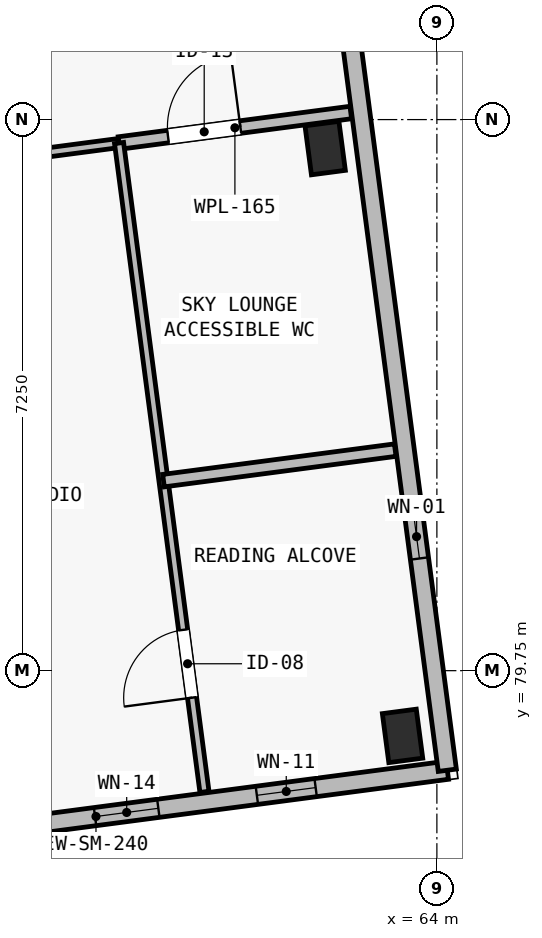
"""IFC4 building model, lengths in metres.
Left out: names, types, materials, properties, quantities, classifications, styles, units other than length and angle.
Written with IfcOpenShell. Run it as: python <this file> out.ifc"""

import sys

from ifc_helpers import new_model, si_unit, direction, frame, frame_2d, origin, origin_2d, place, context, subcontext, project, spatial, rectangle, extrude, element, fill, save


model = new_model("IFC4")
c1 = context("Model", 3, precision=1e-05, world=origin(), true_north=direction((0.0, 1.0)))
c2 = subcontext(c1, "Body", "Model", "MODEL_VIEW")
j1 = project(units=[si_unit("LENGTHUNIT", "METRE"), si_unit("PLANEANGLEUNIT", "RADIAN")], contexts=[c1])
p1 = place(None, origin())
s1 = spatial("IfcSite", under=j1, at=p1, CompositionType="ELEMENT")
p2 = place(p1, origin())
s2 = spatial("IfcBuilding", under=s1, at=p2, CompositionType="ELEMENT")
p3 = place(p2, frame((0.0, 0.0, 34.4)))
s3 = spatial("IfcBuildingStorey", under=s2, at=p3, CompositionType="ELEMENT", Elevation=34.4)
for number, where, z_axis, x_axis in (
    (1, (63.548, 78.892, 0.0), (0.0, 0.0, 1.0), (0.991, 0.131, 0.0)),
    (2, (62.53, 86.625, 0.0), (0.0, 0.0, 1.0), (0.991, 0.131, 0.0)),
):
    element("IfcColumn", number, at=place(p3, frame(where, z_axis=z_axis, x_axis=x_axis)), inside=s3, PredefinedType="COLUMN", context=c2, shape_type="SweptSolid", body=[
        extrude(rectangle(XDim=0.45, YDim=0.65, at=origin_2d()), origin(), (0.0, 0.0, 1.0), 3.25),
    ])
p4 = place(p3, frame((64.137, 78.44, 0.0), z_axis=(0.0, 0.0, 1.0), x_axis=(-0.991446273426, -0.130515466173, 0.0)))
e3 = element("IfcWall", 3, at=p4, inside=s3, PredefinedType="SOLIDWALL", context=c2, shape_type="SweptSolid", body=[
    extrude(rectangle(XDim=9.325, YDim=0.24, at=frame_2d((4.663, 0.0))), origin(), (0.0, 0.0, 1.0), 3.0),
])
p5 = place(p4, frame((1.747, 0.0, 0.42)))
e4 = element("IfcOpeningElement", 4, at=p5, cuts=e3, PredefinedType="OPENING", context=c2, shape_type="SweptSolid", body=[
    extrude(rectangle(XDim=0.78, YDim=2.2, at=frame_2d((0.39, 1.1))), frame((0.0, 0.135, 0.0), z_axis=(0.0, -1.0, 0.0), x_axis=(1.0, 0.0, 0.0)), (0.0, 0.0, 1.0), 0.27),
])
p6 = place(p4, frame((3.835, 0.0, 0.42)))
e5 = element("IfcOpeningElement", 5, at=p6, cuts=e3, PredefinedType="OPENING", context=c2, shape_type="SweptSolid", body=[
    extrude(rectangle(XDim=0.84, YDim=2.28, at=frame_2d((0.42, 1.14))), frame((0.0, 0.135, 0.0), z_axis=(0.0, -1.0, 0.0), x_axis=(1.0, 0.0, 0.0)), (0.0, 0.0, 1.0), 0.27),
])
p7 = place(p4, frame((7.855, 0.0, 0.48)))
e6 = element("IfcOpeningElement", 6, at=p7, cuts=e3, PredefinedType="OPENING", context=c2, shape_type="SweptSolid", body=[
    extrude(rectangle(XDim=0.86, YDim=2.36, at=frame_2d((0.43, 1.18))), frame((0.0, 0.135, 0.0), z_axis=(0.0, -1.0, 0.0), x_axis=(1.0, 0.0, 0.0)), (0.0, 0.0, 1.0), 0.27),
])
p8 = place(p3, frame((61.39, 99.31, 0.0), z_axis=(0.0, 0.0, 1.0), x_axis=(0.13052411616, -0.99144513469, 0.0)))
e7 = element("IfcWall", 7, at=p8, inside=s3, PredefinedType="SOLIDWALL", context=c2, shape_type="SweptSolid", body=[
    extrude(rectangle(XDim=21.05, YDim=0.24, at=frame_2d((10.525, 0.0))), origin(), (0.0, 0.0, 1.0), 3.0),
])
p9 = place(p8, frame((2.81, 0.0, 0.45)))
e8 = element("IfcOpeningElement", 8, at=p9, cuts=e7, PredefinedType="OPENING", context=c2, shape_type="SweptSolid", body=[
    extrude(rectangle(XDim=0.74, YDim=2.26, at=frame_2d((0.37, 1.13))), frame((0.0, 0.135, 0.0), z_axis=(0.0, -1.0, 0.0), x_axis=(1.0, 0.0, 0.0)), (0.0, 0.0, 1.0), 0.27),
])
p10 = place(p8, frame((17.66, 0.0, 0.52)))
e9 = element("IfcOpeningElement", 9, at=p10, cuts=e7, PredefinedType="OPENING", context=c2, shape_type="SweptSolid", body=[
    extrude(rectangle(XDim=0.58, YDim=2.16, at=frame_2d((0.29, 1.08))), frame((0.0, 0.135, 0.0), z_axis=(0.0, -1.0, 0.0), x_axis=(1.0, 0.0, 0.0)), (0.0, 0.0, 1.0), 0.27),
])
p11 = place(p3, frame((53.984, 85.924, 0.0), z_axis=(0.0, 0.0, 1.0), x_axis=(0.991446810256, 0.130511388136, 0.0)))
e10 = element("IfcWall", 10, at=p11, inside=s3, PredefinedType="PARTITIONING", context=c2, shape_type="SweptSolid", body=[
    extrude(rectangle(XDim=5.885, YDim=0.12, at=frame_2d((2.942, 0.0))), origin(), (0.0, 0.0, 1.0), 2.97),
])
p12 = place(p11, frame((1.15, 0.0, 0.0)))
e11 = element("IfcOpeningElement", 11, at=p12, cuts=e10, PredefinedType="OPENING", context=c2, shape_type="SweptSolid", body=[
    extrude(rectangle(XDim=1.15, YDim=2.15, at=frame_2d((0.575, 1.075))), frame((0.0, 0.075, 0.0), z_axis=(0.0, -1.0, 0.0), x_axis=(1.0, 0.0, 0.0)), (0.0, 0.0, 1.0), 0.15),
])
p13 = place(p3, frame((59.818, 86.692, 0.0), z_axis=(0.0, 0.0, 1.0), x_axis=(0.991444293548, 0.130530505213, 0.0)))
e12 = element("IfcWall", 12, at=p13, inside=s3, PredefinedType="PLUMBINGWALL", context=c2, shape_type="SweptSolid", body=[
    extrude(rectangle(XDim=3.075, YDim=0.165, at=frame_2d((1.538, 0.0))), origin(), (0.0, 0.0, 1.0), 2.97),
])
p14 = place(p13, frame((0.65, 0.0, 0.0)))
e13 = element("IfcOpeningElement", 13, at=p14, cuts=e12, PredefinedType="OPENING", context=c2, shape_type="SweptSolid", body=[
    extrude(rectangle(XDim=0.96, YDim=2.12, at=frame_2d((0.48, 1.06))), frame((0.0, 0.097, 0.0), z_axis=(0.0, -1.0, 0.0), x_axis=(1.0, 0.0, 0.0)), (0.0, 0.0, 1.0), 0.195),
])
p15 = place(p3, frame((60.942, 78.155, 0.0), z_axis=(0.0, 0.0, 1.0), x_axis=(-0.13051979335, 0.99144570378, 0.0)))
e14 = element("IfcWall", 14, at=p15, inside=s3, PredefinedType="PARTITIONING", context=c2, shape_type="SweptSolid", body=[
    extrude(rectangle(XDim=8.61, YDim=0.12, at=frame_2d((4.305, 0.0))), origin(), (0.0, 0.0, 1.0), 2.97),
])
p16 = place(p15, frame((1.25, 0.0, 0.0)))
e15 = element("IfcOpeningElement", 15, at=p16, cuts=e14, PredefinedType="OPENING", context=c2, shape_type="SweptSolid", body=[
    extrude(rectangle(XDim=0.9, YDim=2.1, at=frame_2d((0.45, 1.05))), frame((0.0, 0.075, 0.0), z_axis=(0.0, -1.0, 0.0), x_axis=(1.0, 0.0, 0.0)), (0.0, 0.0, 1.0), 0.15),
])
p17 = place(p3, frame((60.403, 82.25, 0.0), z_axis=(0.0, 0.0, 1.0), x_axis=(0.991444293548, 0.130530505213, 0.0)))
e16 = element("IfcWall", 16, at=p17, inside=s3, PredefinedType="PLUMBINGWALL", context=c2, shape_type="SweptSolid", body=[
    extrude(rectangle(XDim=3.075, YDim=0.165, at=frame_2d((1.538, 0.0))), origin(), (0.0, 0.0, 1.0), 2.97),
])
p18 = place(p5, origin())
e17 = element("IfcWindow", 17, at=p18, inside=s3, PartitioningType="SINGLE_PANEL", PredefinedType="WINDOW", context=c2, shape_type="SweptSolid", body=[
    extrude(rectangle(XDim=0.78, YDim=2.2, at=frame_2d((0.39, 1.1))), frame((0.0, 0.03, 0.0), z_axis=(0.0, -1.0, 0.0), x_axis=(1.0, 0.0, 0.0)), (0.0, 0.0, 1.0), 0.06),
])
fill(e4, e17)
p19 = place(p6, origin())
e18 = element("IfcWindow", 18, at=p19, inside=s3, PartitioningType="SINGLE_PANEL", PredefinedType="WINDOW", context=c2, shape_type="SweptSolid", body=[
    extrude(rectangle(XDim=0.84, YDim=2.28, at=frame_2d((0.42, 1.14))), frame((0.0, 0.03, 0.0), z_axis=(0.0, -1.0, 0.0), x_axis=(1.0, 0.0, 0.0)), (0.0, 0.0, 1.0), 0.06),
])
fill(e5, e18)
p20 = place(p10, origin())
e19 = element("IfcWindow", 19, at=p20, inside=s3, PartitioningType="SINGLE_PANEL", PredefinedType="WINDOW", context=c2, shape_type="SweptSolid", body=[
    extrude(rectangle(XDim=0.58, YDim=2.16, at=frame_2d((0.29, 1.08))), frame((0.0, 0.03, 0.0), z_axis=(0.0, -1.0, 0.0), x_axis=(1.0, 0.0, 0.0)), (0.0, 0.0, 1.0), 0.06),
])
fill(e9, e19)
p21 = place(p14, origin())
e20 = element("IfcDoor", 20, at=p21, inside=s3, OperationType="SINGLE_SWING_RIGHT", PredefinedType="DOOR", context=c2, shape_type="SweptSolid", body=[
    extrude(rectangle(XDim=0.96, YDim=2.12, at=frame_2d((0.48, 1.06))), frame((0.0, 0.025, 0.0), z_axis=(0.0, -1.0, 0.0), x_axis=(1.0, 0.0, 0.0)), (0.0, 0.0, 1.0), 0.05),
])
fill(e13, e20)
p22 = place(p16, origin())
e21 = element("IfcDoor", 21, at=p22, inside=s3, OperationType="SINGLE_SWING_LEFT", PredefinedType="DOOR", context=c2, shape_type="SweptSolid", body=[
    extrude(rectangle(XDim=0.9, YDim=2.1, at=frame_2d((0.45, 1.05))), frame((0.0, 0.025, 0.0), z_axis=(0.0, -1.0, 0.0), x_axis=(1.0, 0.0, 0.0)), (0.0, 0.0, 1.0), 0.05),
])
fill(e15, e21)
save(model, sys.argv[1])
